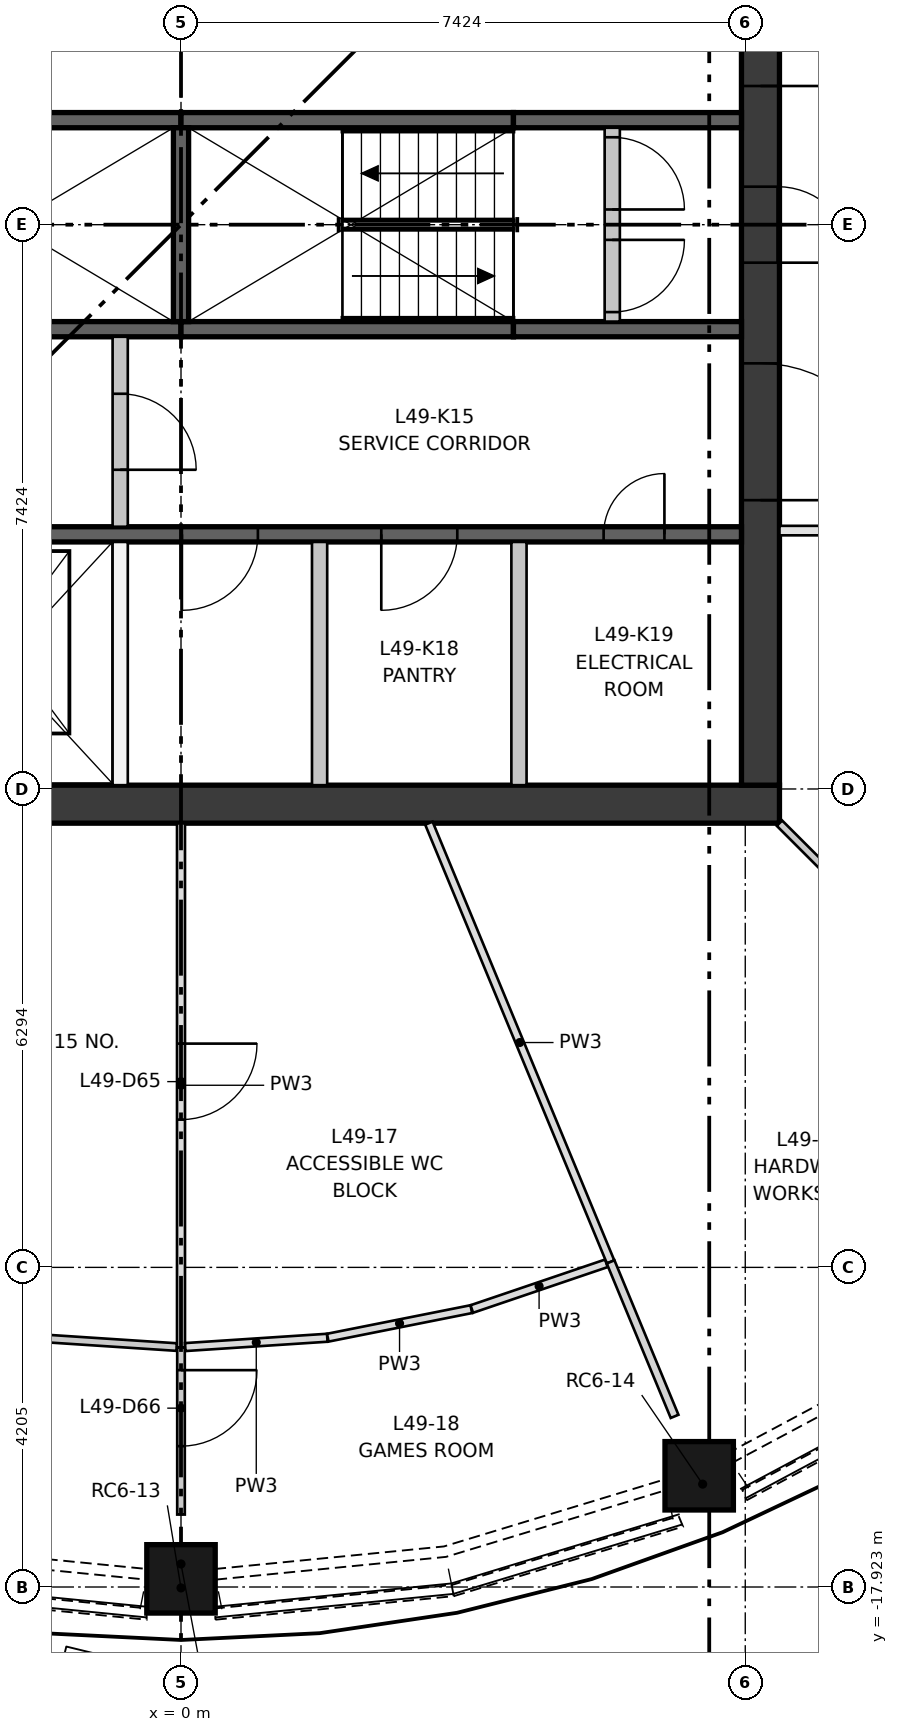
"""IFC4 building model, lengths in metres.
Left out: names, types, materials, properties, quantities, classifications, styles, units other than length and angle.
Written with IfcOpenShell. Run it as: python <this file> out.ifc"""

import sys

from ifc_helpers import new_model, si_unit, direction, frame, frame_2d, origin, origin_2d, place, context, subcontext, project, spatial, polyline, rectangle, outline, extrude, element, fill, save


model = new_model("IFC4")
c1 = context("Model", 3, precision=1e-05, world=origin(), true_north=direction((0.0, 1.0)))
c2 = subcontext(c1, "Body", "Model", "MODEL_VIEW")
j1 = project(units=[si_unit("LENGTHUNIT", "METRE"), si_unit("PLANEANGLEUNIT", "RADIAN")], contexts=[c1])
p1 = place(None, origin())
s1 = spatial("IfcSite", under=j1, at=p1, CompositionType="ELEMENT")
p2 = place(p1, origin())
s2 = spatial("IfcBuilding", under=s1, at=p2, CompositionType="ELEMENT")
p3 = place(p2, frame((0.0, 0.0, 184.3)))
s3 = spatial("IfcBuildingStorey", under=s2, at=p3, CompositionType="ELEMENT", Elevation=184.3)
p4 = place(p3, frame((0.0, -17.935, 0.5), z_axis=(0.0, 0.0, 1.0), x_axis=(-1.0, 0.0, 0.0)))
e1 = element("IfcColumn", 1, at=p4, inside=s3, PredefinedType="COLUMN", context=c2, shape_type="SweptSolid", body=[
    extrude(rectangle(XDim=0.9, YDim=0.9, at=origin_2d()), origin(), (0.0, -0.168, 0.986), 2.384),
])
p5 = place(p3, frame((6.863, -16.57, 0.5), z_axis=(0.0, 0.0, 1.0), x_axis=(-0.924120904221, -0.382100188932, 0.0)))
e2 = element("IfcColumn", 2, at=p5, inside=s3, PredefinedType="COLUMN", context=c2, shape_type="SweptSolid", body=[
    extrude(rectangle(XDim=0.9, YDim=0.9, at=origin_2d()), origin(), (0.0, -0.168, 0.986), 2.384),
])
p6 = place(p3, frame((-7.874, -7.624, 0.0), z_axis=(0.0, 0.0, 1.0), x_axis=(1.0, 0.0, 0.0)))
e3 = element("IfcWall", 3, at=p6, inside=s3, PredefinedType="SHEAR", context=c2, shape_type="SweptSolid", body=[
    extrude(rectangle(XDim=15.748, YDim=0.5, at=frame_2d((7.874, 0.0))), origin(), (0.0, 0.0, 1.0), 3.35),
])
p7 = place(p3, frame((7.624, -7.374, 0.0), z_axis=(0.0, 0.0, 1.0), x_axis=(0.0, 1.0, 0.0)))
e4 = element("IfcWall", 4, at=p7, inside=s3, PredefinedType="SHEAR", context=c2, shape_type="SweptSolid", body=[
    extrude(rectangle(XDim=14.748, YDim=0.5, at=frame_2d((7.374, 0.0))), origin(), (0.0, 0.0, 1.0), 3.35),
])
p8 = place(p7, frame((6.874, 0.0, 0.0)))
e5 = element("IfcOpeningElement", 5, at=p8, cuts=e4, PredefinedType="OPENING", context=c2, shape_type="SweptSolid", body=[
    extrude(rectangle(XDim=1.0, YDim=2.1, at=frame_2d((0.5, 1.05))), frame((0.0, 0.26, 0.0), z_axis=(0.0, -1.0, 0.0), x_axis=(1.0, 0.0, 0.0)), (0.0, 0.0, 1.0), 0.52),
])
p9 = place(p7, frame((3.75, 0.0, 0.0)))
e6 = element("IfcOpeningElement", 6, at=p9, cuts=e4, PredefinedType="OPENING", context=c2, shape_type="SweptSolid", body=[
    extrude(rectangle(XDim=1.8, YDim=2.1, at=frame_2d((0.9, 1.05))), frame((0.0, 0.26, 0.0), z_axis=(0.0, -1.0, 0.0), x_axis=(1.0, 0.0, 0.0)), (0.0, 0.0, 1.0), 0.52),
])
p10 = place(p7, frame((9.198, 0.0, 0.0)))
e7 = element("IfcOpeningElement", 7, at=p10, cuts=e4, PredefinedType="OPENING", context=c2, shape_type="SweptSolid", body=[
    extrude(rectangle(XDim=1.8, YDim=2.1, at=frame_2d((0.9, 1.05))), frame((0.0, 0.26, 0.0), z_axis=(0.0, -1.0, 0.0), x_axis=(1.0, 0.0, 0.0)), (0.0, 0.0, 1.0), 0.52),
])
p11 = place(p3, frame((-7.374, -4.074, 0.0), z_axis=(0.0, 0.0, 1.0), x_axis=(1.0, 0.0, 0.0)))
e8 = element("IfcWall", 8, at=p11, inside=s3, PredefinedType="SHEAR", context=c2, shape_type="SweptSolid", body=[
    extrude(rectangle(XDim=14.748, YDim=0.2, at=frame_2d((7.374, 0.0))), origin(), (0.0, 0.0, 1.0), 3.0),
])
p12 = place(p11, frame((1.319, 0.0, 0.0)))
e9 = element("IfcOpeningElement", 9, at=p12, cuts=e8, PredefinedType="OPENING", context=c2, shape_type="SweptSolid", body=[
    extrude(rectangle(XDim=1.1, YDim=2.1, at=frame_2d((0.55, 1.05))), frame((0.0, 0.11, 0.0), z_axis=(0.0, -1.0, 0.0), x_axis=(1.0, 0.0, 0.0)), (0.0, 0.0, 1.0), 0.22),
])
p13 = place(p11, frame((4.456, 0.0, 0.0)))
e10 = element("IfcOpeningElement", 10, at=p13, cuts=e8, PredefinedType="OPENING", context=c2, shape_type="SweptSolid", body=[
    extrude(rectangle(XDim=1.1, YDim=2.1, at=frame_2d((0.55, 1.05))), frame((0.0, 0.11, 0.0), z_axis=(0.0, -1.0, 0.0), x_axis=(1.0, 0.0, 0.0)), (0.0, 0.0, 1.0), 0.22),
])
p14 = place(p11, frame((7.386, 0.0, 0.0)))
e11 = element("IfcOpeningElement", 11, at=p14, cuts=e8, PredefinedType="OPENING", context=c2, shape_type="SweptSolid", body=[
    extrude(rectangle(XDim=1.0, YDim=2.1, at=frame_2d((0.5, 1.05))), frame((0.0, 0.11, 0.0), z_axis=(0.0, -1.0, 0.0), x_axis=(1.0, 0.0, 0.0)), (0.0, 0.0, 1.0), 0.22),
])
p15 = place(p11, frame((10.009, 0.0, 0.0)))
e12 = element("IfcOpeningElement", 12, at=p15, cuts=e8, PredefinedType="OPENING", context=c2, shape_type="SweptSolid", body=[
    extrude(rectangle(XDim=1.0, YDim=2.1, at=frame_2d((0.5, 1.05))), frame((0.0, 0.11, 0.0), z_axis=(0.0, -1.0, 0.0), x_axis=(1.0, 0.0, 0.0)), (0.0, 0.0, 1.0), 0.22),
])
p16 = place(p11, frame((12.934, 0.0, 0.0)))
e13 = element("IfcOpeningElement", 13, at=p16, cuts=e8, PredefinedType="OPENING", context=c2, shape_type="SweptSolid", body=[
    extrude(rectangle(XDim=0.8, YDim=2.1, at=frame_2d((0.4, 1.05))), frame((0.0, 0.11, 0.0), z_axis=(0.0, -1.0, 0.0), x_axis=(1.0, 0.0, 0.0)), (0.0, 0.0, 1.0), 0.22),
])
for number, where, z_axis, x_axis in (
    (14, (-4.374, -1.375, 0.0), (0.0, 0.0, 1.0), (1.0, 0.0, 0.0)),
    (15, (0.0, -1.375, 0.0), (0.0, 0.0, 1.0), (1.0, 0.0, 0.0)),
):
    element("IfcWall", number, at=place(p3, frame(where, z_axis=z_axis, x_axis=x_axis)), inside=s3, PredefinedType="SHEAR", context=c2, shape_type="SweptSolid", body=[
        extrude(rectangle(XDim=4.374, YDim=0.2, at=frame_2d((2.187, 0.0))), origin(), (0.0, 0.0, 1.0), 3.0),
    ])
p17 = place(p3, frame((4.374, -1.375, 0.0), z_axis=(0.0, 0.0, 1.0), x_axis=(1.0, 0.0, 0.0)))
e16 = element("IfcWall", 16, at=p17, inside=s3, PredefinedType="SHEAR", context=c2, shape_type="SweptSolid", body=[
    extrude(rectangle(XDim=3.0, YDim=0.2, at=frame_2d((1.5, 0.0))), origin(), (0.0, 0.0, 1.0), 3.0),
])
for number, where, z_axis, x_axis in (
    (17, (-4.374, 1.375, 0.0), (0.0, 0.0, 1.0), (1.0, 0.0, 0.0)),
    (18, (0.0, 1.375, 0.0), (0.0, 0.0, 1.0), (1.0, 0.0, 0.0)),
):
    element("IfcWall", number, at=place(p3, frame(where, z_axis=z_axis, x_axis=x_axis)), inside=s3, PredefinedType="SHEAR", context=c2, shape_type="SweptSolid", body=[
        extrude(rectangle(XDim=4.374, YDim=0.2, at=frame_2d((2.187, 0.0))), origin(), (0.0, 0.0, 1.0), 3.0),
    ])
p18 = place(p3, frame((4.374, 1.375, 0.0), z_axis=(0.0, 0.0, 1.0), x_axis=(1.0, 0.0, 0.0)))
e19 = element("IfcWall", 19, at=p18, inside=s3, PredefinedType="SHEAR", context=c2, shape_type="SweptSolid", body=[
    extrude(rectangle(XDim=3.0, YDim=0.2, at=frame_2d((1.5, 0.0))), origin(), (0.0, 0.0, 1.0), 3.0),
])
p19 = place(p3, frame((0.0, -1.275, 0.0), z_axis=(0.0, 0.0, 1.0), x_axis=(0.0, 1.0, 0.0)))
e20 = element("IfcWall", 20, at=p19, inside=s3, PredefinedType="SHEAR", context=c2, shape_type="SweptSolid", body=[
    extrude(rectangle(XDim=2.55, YDim=0.2, at=frame_2d((1.275, 0.0))), origin(), (0.0, 0.0, 1.0), 3.0),
])
p20 = place(p3, frame((-0.8, -7.374, 0.0), z_axis=(0.0, 0.0, 1.0), x_axis=(0.0, 1.0, 0.0)))
e21 = element("IfcWall", 21, at=p20, inside=s3, PredefinedType="PARTITIONING", context=c2, shape_type="SweptSolid", body=[
    extrude(rectangle(XDim=3.2, YDim=0.2, at=frame_2d((1.6, 0.0))), origin(), (0.0, 0.0, 1.0), 3.0),
])
p21 = place(p3, frame((-0.8, -3.974, 0.0), z_axis=(0.0, 0.0, 1.0), x_axis=(0.0, 1.0, 0.0)))
e22 = element("IfcWall", 22, at=p21, inside=s3, PredefinedType="PARTITIONING", context=c2, shape_type="SweptSolid", body=[
    extrude(rectangle(XDim=2.499, YDim=0.2, at=frame_2d((1.25, 0.0))), origin(), (0.0, 0.0, 1.0), 3.0),
])
p22 = place(p21, frame((0.75, 0.0, 0.0)))
e23 = element("IfcOpeningElement", 23, at=p22, cuts=e22, PredefinedType="OPENING", context=c2, shape_type="SweptSolid", body=[
    extrude(rectangle(XDim=1.0, YDim=2.1, at=frame_2d((0.5, 1.05))), frame((0.0, 0.11, 0.0), z_axis=(0.0, -1.0, 0.0), x_axis=(1.0, 0.0, 0.0)), (0.0, 0.0, 1.0), 0.22),
])
for number, where, z_axis, x_axis in (
    (24, (1.823, -7.374, 0.0), (0.0, 0.0, 1.0), (0.0, 1.0, 0.0)),
    (25, (4.447, -7.374, 0.0), (0.0, 0.0, 1.0), (0.0, 1.0, 0.0)),
):
    element("IfcWall", number, at=place(p3, frame(where, z_axis=z_axis, x_axis=x_axis)), inside=s3, PredefinedType="PARTITIONING", context=c2, shape_type="SweptSolid", body=[
        extrude(rectangle(XDim=3.2, YDim=0.2, at=frame_2d((1.6, 0.0))), origin(), (0.0, 0.0, 1.0), 3.0),
    ])
p23 = place(p3, frame((5.674, -1.275, 0.0), z_axis=(0.0, 0.0, 1.0), x_axis=(0.0, 1.0, 0.0)))
e26 = element("IfcWall", 26, at=p23, inside=s3, PredefinedType="PARTITIONING", context=c2, shape_type="SweptSolid", body=[
    extrude(rectangle(XDim=2.55, YDim=0.2, at=frame_2d((1.275, 0.0))), origin(), (0.0, 0.0, 1.0), 3.0),
])
p24 = place(p23, frame((0.125, 0.0, 0.0)))
e27 = element("IfcOpeningElement", 27, at=p24, cuts=e26, PredefinedType="OPENING", context=c2, shape_type="SweptSolid", body=[
    extrude(rectangle(XDim=0.95, YDim=2.1, at=frame_2d((0.475, 1.05))), frame((0.0, 0.11, 0.0), z_axis=(0.0, -1.0, 0.0), x_axis=(1.0, 0.0, 0.0)), (0.0, 0.0, 1.0), 0.22),
])
p25 = place(p23, frame((1.475, 0.0, 0.0)))
e28 = element("IfcOpeningElement", 28, at=p25, cuts=e26, PredefinedType="OPENING", context=c2, shape_type="SweptSolid", body=[
    extrude(rectangle(XDim=0.95, YDim=2.1, at=frame_2d((0.475, 1.05))), frame((0.0, 0.11, 0.0), z_axis=(0.0, -1.0, 0.0), x_axis=(1.0, 0.0, 0.0)), (0.0, 0.0, 1.0), 0.22),
])
p26 = place(p3, frame((-3.59, -18.043, 0.0), z_axis=(-0.097001095349, -0.981910573414, 0.162611233681), x_axis=(0.995155966643, -0.098308707783, 5.283619e-06)))
e29 = element("IfcWall", 29, at=p26, inside=s3, PredefinedType="SOLIDWALL", context=c2, shape_type="SweptSolid", body=[
    extrude(outline(polyline([(0.0, 0.0), (3.152, 0.0), (3.138, 0.912), (0.015, 0.912), (0.0, 0.0)])), origin(), (0.0, 0.0, -1.0), 0.3),
])
p27 = place(p3, frame((0.452, -18.353, 0.0), z_axis=(0.096960979381, -0.981893053275, 0.162740899619), x_axis=(0.995159671342, 0.098271198901, 9.28862e-07)))
e30 = element("IfcWall", 30, at=p27, inside=s3, PredefinedType="SOLIDWALL", context=c2, shape_type="SweptSolid", body=[
    extrude(outline(polyline([(0.0, 0.0), (3.152, 1.388e-17), (3.138, 0.912), (0.015, 0.912), (0.0, 0.0)])), origin(), (0.0, 0.0, -1.0), 0.3),
])
p28 = place(p3, frame((3.59, -18.043, 0.0), z_axis=(0.286418531815, -0.944194299341, 0.162670064008), x_axis=(0.956940039415, 0.290285654048, 4.29464e-06)))
e31 = element("IfcWall", 31, at=p28, inside=s3, PredefinedType="SOLIDWALL", context=c2, shape_type="SweptSolid", body=[
    extrude(outline(polyline([(0.0, 0.0), (3.151, 5.551e-17), (3.137, 0.912), (0.014, 0.912), (0.0, 0.0)])), origin(), (0.0, 0.0, -1.0), 0.3),
])
p29 = place(p3, frame((7.441, -16.782, 0.0), z_axis=(0.465338838382, -0.870053087177, 0.162688017342), x_axis=(0.881801348468, 0.471621015005, -6.731272e-06)))
e32 = element("IfcWall", 32, at=p29, inside=s3, PredefinedType="SOLIDWALL", context=c2, shape_type="SweptSolid", body=[
    extrude(outline(polyline([(0.0, 0.0), (3.152, 2.776e-17), (3.137, 0.912), (0.015, 0.912), (0.0, 0.0)])), origin(), (0.0, 0.0, -1.0), 0.3),
])
p30 = place(p3, frame((13.795, -4.024, 0.0), z_axis=(0.0, 0.0, 1.0), x_axis=(-1.0, 0.0, 0.0)))
e33 = element("IfcWall", 33, at=p30, inside=s3, PredefinedType="PARTITIONING", context=c2, shape_type="SweptSolid", body=[
    extrude(rectangle(XDim=5.921, YDim=0.125, at=frame_2d((2.96, 0.0))), origin(), (0.0, 0.0, 1.0), 3.0),
])
p31 = place(p30, frame((2.5, 0.0, 0.0)))
e34 = element("IfcOpeningElement", 34, at=p31, cuts=e33, PredefinedType="OPENING", context=c2, shape_type="SweptSolid", body=[
    extrude(rectangle(XDim=1.0, YDim=2.1, at=frame_2d((0.5, 1.05))), frame((0.0, 0.073, 0.0), z_axis=(0.0, -1.0, 0.0), x_axis=(1.0, 0.0, 0.0)), (0.0, 0.0, 1.0), 0.145),
])
p32 = place(p3, frame((-0.056, -14.766, 0.0), z_axis=(0.0, 0.0, 1.0), x_axis=(-0.997856111695, 0.065446010984, 0.0)))
e35 = element("IfcWall", 35, at=p32, inside=s3, PredefinedType="PARTITIONING", context=c2, shape_type="SweptSolid", body=[
    extrude(rectangle(XDim=1.873, YDim=0.1, at=frame_2d((0.936, 0.0))), origin(), (0.0, 0.0, 1.0), 3.0),
])
p33 = place(p3, frame((0.0, -7.874, 0.0), z_axis=(0.0, 0.0, 1.0), x_axis=(0.0, -1.0, 0.0)))
e36 = element("IfcWall", 36, at=p33, inside=s3, PredefinedType="PARTITIONING", context=c2, shape_type="SweptSolid", body=[
    extrude(rectangle(XDim=6.896, YDim=0.105, at=frame_2d((3.448, 0.0))), origin(), (0.0, 0.0, 1.0), 3.0),
])
p34 = place(p33, frame((2.9, 0.0, 0.0)))
e37 = element("IfcOpeningElement", 37, at=p34, cuts=e36, PredefinedType="OPENING", context=c2, shape_type="SweptSolid", body=[
    extrude(rectangle(XDim=1.0, YDim=2.1, at=frame_2d((0.5, 1.05))), frame((0.0, 0.062, 0.0), z_axis=(0.0, -1.0, 0.0), x_axis=(1.0, 0.0, 0.0)), (0.0, 0.0, 1.0), 0.125),
])
p35 = place(p3, frame((0.0, -14.77, 0.0), z_axis=(0.0, 0.0, 1.0), x_axis=(0.0, -1.0, 0.0)))
e38 = element("IfcWall", 38, at=p35, inside=s3, PredefinedType="PARTITIONING", context=c2, shape_type="SweptSolid", body=[
    extrude(rectangle(XDim=2.2, YDim=0.1, at=frame_2d((1.1, 0.0))), origin(), (0.0, 0.0, 1.0), 3.0),
])
p36 = place(p35, frame((0.3, 0.0, 0.0)))
e39 = element("IfcOpeningElement", 39, at=p36, cuts=e38, PredefinedType="OPENING", context=c2, shape_type="SweptSolid", body=[
    extrude(rectangle(XDim=1.0, YDim=2.1, at=frame_2d((0.5, 1.05))), frame((0.0, 0.06, 0.0), z_axis=(0.0, -1.0, 0.0), x_axis=(1.0, 0.0, 0.0)), (0.0, 0.0, 1.0), 0.12),
])
p37 = place(p3, frame((1.925, -14.644, 0.0), z_axis=(0.0, 0.0, 1.0), x_axis=(-0.997856111695, -0.065446010984, 0.0)))
e40 = element("IfcWall", 40, at=p37, inside=s3, PredefinedType="PARTITIONING", context=c2, shape_type="SweptSolid", body=[
    extrude(rectangle(XDim=1.873, YDim=0.105, at=frame_2d((0.936, 0.0))), origin(), (0.0, 0.0, 1.0), 3.0),
])
p38 = place(p3, frame((3.819, -14.267, 0.0), z_axis=(0.0, 0.0, 1.0), x_axis=(-0.980789874999, -0.195067222003, 0.0)))
e41 = element("IfcWall", 41, at=p38, inside=s3, PredefinedType="PARTITIONING", context=c2, shape_type="SweptSolid", body=[
    extrude(rectangle(XDim=1.925, YDim=0.105, at=frame_2d((0.962, 0.0))), origin(), (0.0, 0.0, 1.0), 3.0),
])
p39 = place(p3, frame((5.597, -13.665, 0.0), z_axis=(0.0, 0.0, 1.0), x_axis=(-0.946919091427, -0.32147198057, 0.0)))
e42 = element("IfcWall", 42, at=p39, inside=s3, PredefinedType="PARTITIONING", context=c2, shape_type="SweptSolid", body=[
    extrude(rectangle(XDim=1.87, YDim=0.105, at=frame_2d((0.935, 0.0))), origin(), (0.0, 0.0, 1.0), 3.0),
])
p40 = place(p3, frame((3.261, -7.874, 0.0), z_axis=(0.0, 0.0, 1.0), x_axis=(0.382669328176, -0.923885374532, 0.0)))
e43 = element("IfcWall", 43, at=p40, inside=s3, PredefinedType="PARTITIONING", context=c2, shape_type="SweptSolid", body=[
    extrude(rectangle(XDim=6.247, YDim=0.105, at=frame_2d((3.124, 0.0))), origin(), (0.0, 0.0, 1.0), 3.0),
])
p41 = place(p3, frame((5.652, -13.646, 0.0), z_axis=(0.0, 0.0, 1.0), x_axis=(0.382747093259, -0.923853160736, 0.0)))
e44 = element("IfcWall", 44, at=p41, inside=s3, PredefinedType="PARTITIONING", context=c2, shape_type="SweptSolid", body=[
    extrude(rectangle(XDim=2.2, YDim=0.11, at=frame_2d((1.1, 0.0))), origin(), (0.0, 0.0, 1.0), 3.0),
])
p42 = place(p3, frame((12.0, -12.0, 0.0), z_axis=(0.0, 0.0, 1.0), x_axis=(-0.707106781187, 0.707106781187, 0.0)))
e45 = element("IfcWall", 45, at=p42, inside=s3, PredefinedType="PARTITIONING", context=c2, shape_type="SweptSolid", body=[
    extrude(rectangle(XDim=5.834, YDim=0.1, at=frame_2d((2.917, 0.0))), origin(), (0.0, 0.0, 1.0), 3.0),
])
p43 = place(p42, frame((3.0, 0.0, 0.0)))
e46 = element("IfcOpeningElement", 46, at=p43, cuts=e45, PredefinedType="OPENING", context=c2, shape_type="SweptSolid", body=[
    extrude(rectangle(XDim=1.0, YDim=2.1, at=frame_2d((0.5, 1.05))), frame((0.0, 0.06, 0.0), z_axis=(0.0, -1.0, 0.0), x_axis=(1.0, 0.0, 0.0)), (0.0, 0.0, 1.0), 0.12),
])
p44 = place(p24, frame((0.95, 0.0, 0.0), z_axis=(0.0, 0.0, 1.0), x_axis=(-1.0, 0.0, 0.0)))
e47 = element("IfcDoor", 47, at=p44, inside=s3, OperationType="SINGLE_SWING_RIGHT", PredefinedType="DOOR", context=c2, shape_type="SweptSolid", body=[
    extrude(rectangle(XDim=0.95, YDim=2.1, at=frame_2d((0.475, 1.05))), frame((0.0, 0.025, 0.0), z_axis=(0.0, -1.0, 0.0), x_axis=(1.0, 0.0, 0.0)), (0.0, 0.0, 1.0), 0.05),
])
fill(e27, e47)
p45 = place(p25, frame((0.95, 0.0, 0.0), z_axis=(0.0, 0.0, 1.0), x_axis=(-1.0, 0.0, 0.0)))
e48 = element("IfcDoor", 48, at=p45, inside=s3, OperationType="SINGLE_SWING_LEFT", PredefinedType="DOOR", context=c2, shape_type="SweptSolid", body=[
    extrude(rectangle(XDim=0.95, YDim=2.1, at=frame_2d((0.475, 1.05))), frame((0.0, 0.025, 0.0), z_axis=(0.0, -1.0, 0.0), x_axis=(1.0, 0.0, 0.0)), (0.0, 0.0, 1.0), 0.05),
])
fill(e28, e48)
p46 = place(p22, frame((1.0, 0.0, 0.0), z_axis=(0.0, 0.0, 1.0), x_axis=(-1.0, 0.0, 0.0)))
e49 = element("IfcDoor", 49, at=p46, inside=s3, OperationType="SINGLE_SWING_LEFT", PredefinedType="DOOR", context=c2, shape_type="SweptSolid", body=[
    extrude(rectangle(XDim=1.0, YDim=2.1, at=frame_2d((0.5, 1.05))), frame((0.0, 0.025, 0.0), z_axis=(0.0, -1.0, 0.0), x_axis=(1.0, 0.0, 0.0)), (0.0, 0.0, 1.0), 0.05),
])
fill(e23, e49)
p47 = place(p14, frame((1.0, 0.0, 0.0), z_axis=(0.0, 0.0, 1.0), x_axis=(-1.0, 0.0, 0.0)))
e50 = element("IfcDoor", 50, at=p47, inside=s3, OperationType="SINGLE_SWING_LEFT", PredefinedType="DOOR", context=c2, shape_type="SweptSolid", body=[
    extrude(rectangle(XDim=1.0, YDim=2.1, at=frame_2d((0.5, 1.05))), frame((0.0, 0.025, 0.0), z_axis=(0.0, -1.0, 0.0), x_axis=(1.0, 0.0, 0.0)), (0.0, 0.0, 1.0), 0.05),
])
fill(e11, e50)
p48 = place(p15, frame((1.0, 0.0, 0.0), z_axis=(0.0, 0.0, 1.0), x_axis=(-1.0, 0.0, 0.0)))
e51 = element("IfcDoor", 51, at=p48, inside=s3, OperationType="SINGLE_SWING_LEFT", PredefinedType="DOOR", context=c2, shape_type="SweptSolid", body=[
    extrude(rectangle(XDim=1.0, YDim=2.1, at=frame_2d((0.5, 1.05))), frame((0.0, 0.025, 0.0), z_axis=(0.0, -1.0, 0.0), x_axis=(1.0, 0.0, 0.0)), (0.0, 0.0, 1.0), 0.05),
])
fill(e12, e51)
p49 = place(p16, origin())
e52 = element("IfcDoor", 52, at=p49, inside=s3, OperationType="SINGLE_SWING_RIGHT", PredefinedType="DOOR", context=c2, shape_type="SweptSolid", body=[
    extrude(rectangle(XDim=0.8, YDim=2.1, at=frame_2d((0.4, 1.05))), frame((0.0, 0.025, 0.0), z_axis=(0.0, -1.0, 0.0), x_axis=(1.0, 0.0, 0.0)), (0.0, 0.0, 1.0), 0.05),
])
fill(e13, e52)
p50 = place(p8, frame((1.0, 0.0, 0.0), z_axis=(0.0, 0.0, 1.0), x_axis=(-1.0, 0.0, 0.0)))
e53 = element("IfcDoor", 53, at=p50, inside=s3, OperationType="SINGLE_SWING_LEFT", PredefinedType="DOOR", context=c2, shape_type="SweptSolid", body=[
    extrude(rectangle(XDim=1.0, YDim=2.1, at=frame_2d((0.5, 1.05))), frame((0.0, 0.25, 0.0), z_axis=(0.0, -1.0, 0.0), x_axis=(1.0, 0.0, 0.0)), (0.0, 0.0, 1.0), 0.05),
])
fill(e5, e53)
p51 = place(p9, frame((1.8, 0.0, 0.0), z_axis=(0.0, 0.0, 1.0), x_axis=(-1.0, 0.0, 0.0)))
e54 = element("IfcDoor", 54, at=p51, inside=s3, OperationType="DOUBLE_DOOR_SINGLE_SWING", PredefinedType="DOOR", context=c2, shape_type="SweptSolid", body=[
    extrude(rectangle(XDim=1.8, YDim=2.1, at=frame_2d((0.9, 1.05))), frame((0.0, 0.025, 0.0), z_axis=(0.0, -1.0, 0.0), x_axis=(1.0, 0.0, 0.0)), (0.0, 0.0, 1.0), 0.05),
])
fill(e6, e54)
p52 = place(p10, frame((1.8, 0.0, 0.0), z_axis=(0.0, 0.0, 1.0), x_axis=(-1.0, 0.0, 0.0)))
e55 = element("IfcDoor", 55, at=p52, inside=s3, OperationType="DOUBLE_DOOR_SINGLE_SWING", PredefinedType="DOOR", context=c2, shape_type="SweptSolid", body=[
    extrude(rectangle(XDim=1.8, YDim=2.1, at=frame_2d((0.9, 1.05))), frame((0.0, 0.025, 0.0), z_axis=(0.0, -1.0, 0.0), x_axis=(1.0, 0.0, 0.0)), (0.0, 0.0, 1.0), 0.05),
])
fill(e7, e55)
p53 = place(p34, origin())
e56 = element("IfcDoor", 56, at=p53, inside=s3, OperationType="SINGLE_SWING_LEFT", PredefinedType="DOOR", context=c2, shape_type="SweptSolid", body=[
    extrude(rectangle(XDim=1.0, YDim=2.1, at=frame_2d((0.5, 1.05))), frame((0.0, 0.025, 0.0), z_axis=(0.0, -1.0, 0.0), x_axis=(1.0, 0.0, 0.0)), (0.0, 0.0, 1.0), 0.05),
])
fill(e37, e56)
p54 = place(p36, origin())
e57 = element("IfcDoor", 57, at=p54, inside=s3, OperationType="SINGLE_SWING_LEFT", PredefinedType="DOOR", context=c2, shape_type="SweptSolid", body=[
    extrude(rectangle(XDim=1.0, YDim=2.1, at=frame_2d((0.5, 1.05))), frame((0.0, 0.025, 0.0), z_axis=(0.0, -1.0, 0.0), x_axis=(1.0, 0.0, 0.0)), (0.0, 0.0, 1.0), 0.05),
])
fill(e39, e57)
save(model, sys.argv[1])
